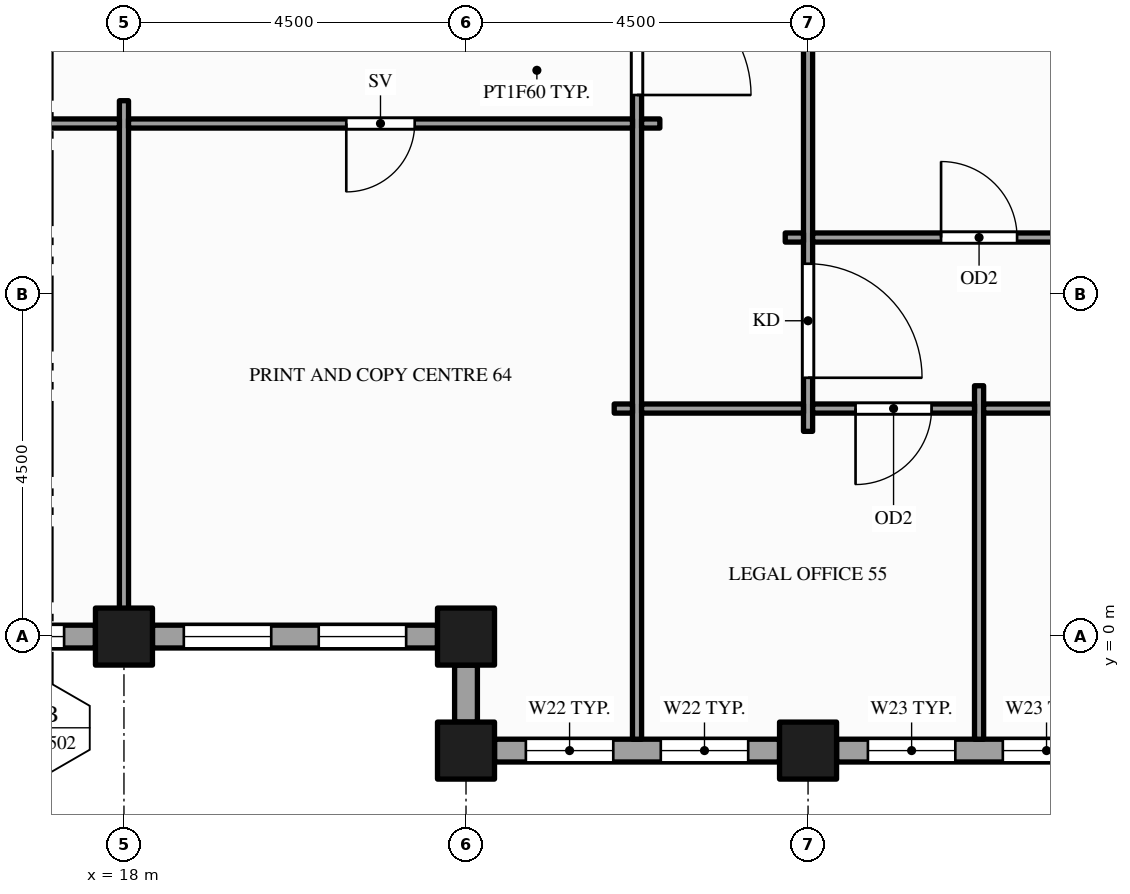
"""IFC4 building model, lengths in metres.
Left out: names, types, materials, properties, quantities, classifications, styles, units other than length and angle.
Written with IfcOpenShell. Run it as: python <this file> out.ifc"""

import sys

from ifc_helpers import new_model, si_unit, direction, frame, frame_2d, origin, origin_2d, place, context, subcontext, project, spatial, rectangle, hollow_rectangle, extrude, element, fill, save


model = new_model("IFC4")
c1 = context("Model", 3, precision=1e-05, world=origin(), true_north=direction((0.0, 1.0)))
c2 = subcontext(c1, "Body", "Model", "MODEL_VIEW")
j1 = project(units=[si_unit("LENGTHUNIT", "METRE"), si_unit("PLANEANGLEUNIT", "RADIAN")], contexts=[c1])
p1 = place(None, origin())
s1 = spatial("IfcSite", under=j1, at=p1, CompositionType="ELEMENT")
p2 = place(p1, origin())
s2 = spatial("IfcBuilding", under=s1, at=p2, CompositionType="ELEMENT")
p3 = place(p2, frame((0.0, 0.0, 215.0)))
s3 = spatial("IfcBuildingStorey", under=s2, at=p3, CompositionType="ELEMENT", Elevation=215.0)
for number, where, z_axis, x_axis in (
    (1, (18.0, 0.0, -0.15), (0.0, 0.0, 1.0), (1.0, 0.0, 0.0)),
    (2, (22.5, -1.5, -0.15), (0.0, 0.0, 1.0), (1.0, 0.0, 0.0)),
    (3, (22.5, 0.0, -0.15), (0.0, 0.0, 1.0), (1.0, 0.0, 0.0)),
    (4, (27.0, -1.5, -0.15), (0.0, 0.0, 1.0), (1.0, 0.0, 0.0)),
):
    element("IfcColumn", number, at=place(p3, frame(where, z_axis=z_axis, x_axis=x_axis)), inside=s3, PredefinedType="COLUMN", context=c2, shape_type="SweptSolid", body=[
        extrude(hollow_rectangle(XDim=0.75, YDim=0.75, WallThickness=0.036, at=origin_2d()), origin(), (0.0, 0.0, 1.0), 4.0),
    ])
p4 = place(p3, frame((22.875, -1.5, 0.0), z_axis=(0.0, 0.0, 1.0), x_axis=(1.0, 0.0, 0.0)))
e5 = element("IfcWall", 5, at=p4, inside=s3, PredefinedType="STANDARD", context=c2, shape_type="SweptSolid", body=[
    extrude(rectangle(XDim=3.75, YDim=0.3, at=frame_2d((1.875, 0.0))), origin(), (0.0, 0.0, 1.0), 2.76),
])
p5 = place(p4, frame((0.413, 0.0, 0.9)))
e6 = element("IfcOpeningElement", 6, at=p5, cuts=e5, PredefinedType="OPENING", context=c2, shape_type="SweptSolid", body=[
    extrude(rectangle(XDim=1.15, YDim=1.5, at=frame_2d((0.575, 0.75))), frame((0.0, 0.16, 0.0), z_axis=(0.0, -1.0, 0.0), x_axis=(1.0, 0.0, 0.0)), (0.0, 0.0, 1.0), 0.32),
])
p6 = place(p4, frame((2.188, 0.0, 0.9)))
e7 = element("IfcOpeningElement", 7, at=p6, cuts=e5, PredefinedType="OPENING", context=c2, shape_type="SweptSolid", body=[
    extrude(rectangle(XDim=1.15, YDim=1.5, at=frame_2d((0.575, 0.75))), frame((0.0, 0.16, 0.0), z_axis=(0.0, -1.0, 0.0), x_axis=(1.0, 0.0, 0.0)), (0.0, 0.0, 1.0), 0.32),
])
p7 = place(p3, frame((27.375, -1.5, 0.0), z_axis=(0.0, 0.0, 1.0), x_axis=(1.0, 0.0, 0.0)))
e8 = element("IfcWall", 8, at=p7, inside=s3, PredefinedType="STANDARD", context=c2, shape_type="SweptSolid", body=[
    extrude(rectangle(XDim=3.75, YDim=0.3, at=frame_2d((1.875, 0.0))), origin(), (0.0, 0.0, 1.0), 2.87),
])
p8 = place(p7, frame((0.413, 0.0, 0.9)))
e9 = element("IfcOpeningElement", 9, at=p8, cuts=e8, PredefinedType="OPENING", context=c2, shape_type="SweptSolid", body=[
    extrude(rectangle(XDim=1.15, YDim=1.75, at=frame_2d((0.575, 0.875))), frame((0.0, 0.16, 0.0), z_axis=(0.0, -1.0, 0.0), x_axis=(1.0, 0.0, 0.0)), (0.0, 0.0, 1.0), 0.32),
])
p9 = place(p7, frame((2.188, 0.0, 0.9)))
e10 = element("IfcOpeningElement", 10, at=p9, cuts=e8, PredefinedType="OPENING", context=c2, shape_type="SweptSolid", body=[
    extrude(rectangle(XDim=1.15, YDim=1.75, at=frame_2d((0.575, 0.875))), frame((0.0, 0.16, 0.0), z_axis=(0.0, -1.0, 0.0), x_axis=(1.0, 0.0, 0.0)), (0.0, 0.0, 1.0), 0.32),
])
p10 = place(p3, frame((13.875, 0.0, 0.0), z_axis=(0.0, 0.0, 1.0), x_axis=(1.0, 0.0, 0.0)))
e11 = element("IfcWall", 11, at=p10, inside=s3, PredefinedType="STANDARD", context=c2, shape_type="SweptSolid", body=[
    extrude(rectangle(XDim=3.75, YDim=0.3, at=frame_2d((1.875, 0.0))), origin(), (0.0, 0.0, 1.0), 2.87),
])
p11 = place(p10, frame((0.413, 0.0, 0.9)))
e12 = element("IfcOpeningElement", 12, at=p11, cuts=e11, PredefinedType="OPENING", context=c2, shape_type="SweptSolid", body=[
    extrude(rectangle(XDim=1.15, YDim=1.75, at=frame_2d((0.575, 0.875))), frame((0.0, 0.16, 0.0), z_axis=(0.0, -1.0, 0.0), x_axis=(1.0, 0.0, 0.0)), (0.0, 0.0, 1.0), 0.32),
])
p12 = place(p10, frame((2.188, 0.0, 0.9)))
e13 = element("IfcOpeningElement", 13, at=p12, cuts=e11, PredefinedType="OPENING", context=c2, shape_type="SweptSolid", body=[
    extrude(rectangle(XDim=1.15, YDim=1.75, at=frame_2d((0.575, 0.875))), frame((0.0, 0.16, 0.0), z_axis=(0.0, -1.0, 0.0), x_axis=(1.0, 0.0, 0.0)), (0.0, 0.0, 1.0), 0.32),
])
p13 = place(p3, frame((18.375, 0.0, 0.0), z_axis=(0.0, 0.0, 1.0), x_axis=(1.0, 0.0, 0.0)))
e14 = element("IfcWall", 14, at=p13, inside=s3, PredefinedType="STANDARD", context=c2, shape_type="SweptSolid", body=[
    extrude(rectangle(XDim=3.75, YDim=0.3, at=frame_2d((1.875, 0.0))), origin(), (0.0, 0.0, 1.0), 2.87),
])
p14 = place(p13, frame((0.413, 0.0, 0.9)))
e15 = element("IfcOpeningElement", 15, at=p14, cuts=e14, PredefinedType="OPENING", context=c2, shape_type="SweptSolid", body=[
    extrude(rectangle(XDim=1.15, YDim=1.75, at=frame_2d((0.575, 0.875))), frame((0.0, 0.16, 0.0), z_axis=(0.0, -1.0, 0.0), x_axis=(1.0, 0.0, 0.0)), (0.0, 0.0, 1.0), 0.32),
])
p15 = place(p13, frame((2.188, 0.0, 0.9)))
e16 = element("IfcOpeningElement", 16, at=p15, cuts=e14, PredefinedType="OPENING", context=c2, shape_type="SweptSolid", body=[
    extrude(rectangle(XDim=1.15, YDim=1.75, at=frame_2d((0.575, 0.875))), frame((0.0, 0.16, 0.0), z_axis=(0.0, -1.0, 0.0), x_axis=(1.0, 0.0, 0.0)), (0.0, 0.0, 1.0), 0.32),
])
p16 = place(p3, frame((22.5, -0.375, 0.0), z_axis=(0.0, 0.0, 1.0), x_axis=(0.0, -1.0, 0.0)))
e17 = element("IfcWall", 17, at=p16, inside=s3, PredefinedType="STANDARD", context=c2, shape_type="SweptSolid", body=[
    extrude(rectangle(XDim=0.75, YDim=0.3, at=frame_2d((0.375, 0.0))), origin(), (0.0, 0.0, 1.0), 3.157),
])
p17 = place(p3, frame((18.0, 0.15, 0.0), z_axis=(0.0, 0.0, 1.0), x_axis=(0.0, 1.0, 0.0)))
e18 = element("IfcWall", 18, at=p17, inside=s3, PredefinedType="PARTITIONING", context=c2, shape_type="SweptSolid", body=[
    extrude(rectangle(XDim=6.9, YDim=0.12, at=frame_2d((3.45, 0.0))), origin(), (0.0, 0.0, 1.0), 2.87),
])
p18 = place(p3, frame((24.75, -1.35, 0.0), z_axis=(0.0, 0.0, 1.0), x_axis=(0.0, 1.0, 0.0)))
e19 = element("IfcWall", 19, at=p18, inside=s3, PredefinedType="PARTITIONING", context=c2, shape_type="SweptSolid", body=[
    extrude(rectangle(XDim=24.101, YDim=0.12, at=frame_2d((12.05, 0.0))), origin(), (0.0, 0.0, 1.0), 2.76),
])
p19 = place(p18, frame((8.475, 0.0, 0.0)))
e20 = element("IfcOpeningElement", 20, at=p19, cuts=e19, PredefinedType="OPENING", context=c2, shape_type="SweptSolid", body=[
    extrude(rectangle(XDim=1.5, YDim=2.1, at=frame_2d((0.75, 1.05))), frame((0.0, 0.07, 0.0), z_axis=(0.0, -1.0, 0.0), x_axis=(1.0, 0.0, 0.0)), (0.0, 0.0, 1.0), 0.14),
])
p20 = place(p18, frame((13.5, 0.0, 0.0)))
e21 = element("IfcOpeningElement", 21, at=p20, cuts=e19, PredefinedType="OPENING", context=c2, shape_type="SweptSolid", body=[
    extrude(rectangle(XDim=1.2, YDim=2.1, at=frame_2d((0.6, 1.05))), frame((0.0, 0.07, 0.0), z_axis=(0.0, -1.0, 0.0), x_axis=(1.0, 0.0, 0.0)), (0.0, 0.0, 1.0), 0.14),
])
p21 = place(p3, frame((27.0, 2.7, 0.0), z_axis=(0.0, 0.0, 1.0), x_axis=(0.0, 1.0, 0.0)))
e22 = element("IfcWall", 22, at=p21, inside=s3, PredefinedType="PARTITIONING", context=c2, shape_type="SweptSolid", body=[
    extrude(rectangle(XDim=14.1, YDim=0.12, at=frame_2d((7.05, 0.0))), origin(), (0.0, 0.0, 1.0), 2.87),
])
p22 = place(p21, frame((0.705, 0.0, 0.0)))
e23 = element("IfcOpeningElement", 23, at=p22, cuts=e22, PredefinedType="OPENING", context=c2, shape_type="SweptSolid", body=[
    extrude(rectangle(XDim=1.5, YDim=2.1, at=frame_2d((0.75, 1.05))), frame((0.0, 0.07, 0.0), z_axis=(0.0, -1.0, 0.0), x_axis=(1.0, 0.0, 0.0)), (0.0, 0.0, 1.0), 0.14),
])
p23 = place(p21, frame((11.895, 0.0, 0.0)))
e24 = element("IfcOpeningElement", 24, at=p23, cuts=e22, PredefinedType="OPENING", context=c2, shape_type="SweptSolid", body=[
    extrude(rectangle(XDim=1.5, YDim=2.1, at=frame_2d((0.75, 1.05))), frame((0.0, 0.07, 0.0), z_axis=(0.0, -1.0, 0.0), x_axis=(1.0, 0.0, 0.0)), (0.0, 0.0, 1.0), 0.14),
])
p24 = place(p3, frame((29.25, -1.35, 0.0), z_axis=(0.0, 0.0, 1.0), x_axis=(0.0, 1.0, 0.0)))
e25 = element("IfcWall", 25, at=p24, inside=s3, PredefinedType="PARTITIONING", context=c2, shape_type="SweptSolid", body=[
    extrude(rectangle(XDim=4.65, YDim=0.12, at=frame_2d((2.325, 0.0))), origin(), (0.0, 0.0, 1.0), 2.87),
])
p25 = place(p3, frame((24.45, 3.0, 0.0), z_axis=(0.0, 0.0, 1.0), x_axis=(1.0, 0.0, 0.0)))
e26 = element("IfcWall", 26, at=p25, inside=s3, PredefinedType="PARTITIONING", context=c2, shape_type="SweptSolid", body=[
    extrude(rectangle(XDim=0.24, YDim=0.12, at=frame_2d((0.12, 0.0))), origin(), (0.0, 0.0, 1.0), 2.76),
])
p26 = place(p3, frame((24.81, 3.0, 0.0), z_axis=(0.0, 0.0, 1.0), x_axis=(1.0, 0.0, 0.0)))
e27 = element("IfcWall", 27, at=p26, inside=s3, PredefinedType="PARTITIONING", context=c2, shape_type="SweptSolid", body=[
    extrude(rectangle(XDim=2.13, YDim=0.12, at=frame_2d((1.065, 0.0))), origin(), (0.0, 0.0, 1.0), 2.76),
])
p27 = place(p3, frame((27.06, 3.0, 0.0), z_axis=(0.0, 0.0, 1.0), x_axis=(1.0, 0.0, 0.0)))
e28 = element("IfcWall", 28, at=p27, inside=s3, PredefinedType="PARTITIONING", context=c2, shape_type="SweptSolid", body=[
    extrude(rectangle(XDim=2.13, YDim=0.12, at=frame_2d((1.065, 0.0))), origin(), (0.0, 0.0, 1.0), 2.87),
])
p28 = place(p27, frame((0.565, 0.0, 0.0)))
e29 = element("IfcOpeningElement", 29, at=p28, cuts=e28, PredefinedType="OPENING", context=c2, shape_type="SweptSolid", body=[
    extrude(rectangle(XDim=1.0, YDim=2.1, at=frame_2d((0.5, 1.05))), frame((0.0, 0.07, 0.0), z_axis=(0.0, -1.0, 0.0), x_axis=(1.0, 0.0, 0.0)), (0.0, 0.0, 1.0), 0.14),
])
p29 = place(p3, frame((29.31, 3.0, 0.0), z_axis=(0.0, 0.0, 1.0), x_axis=(1.0, 0.0, 0.0)))
e30 = element("IfcWall", 30, at=p29, inside=s3, PredefinedType="PARTITIONING", context=c2, shape_type="SweptSolid", body=[
    extrude(rectangle(XDim=4.38, YDim=0.12, at=frame_2d((2.19, 0.0))), origin(), (0.0, 0.0, 1.0), 2.87),
])
p30 = place(p29, frame((1.69, 0.0, 0.0)))
e31 = element("IfcOpeningElement", 31, at=p30, cuts=e30, PredefinedType="OPENING", context=c2, shape_type="SweptSolid", body=[
    extrude(rectangle(XDim=1.0, YDim=2.1, at=frame_2d((0.5, 1.05))), frame((0.0, 0.07, 0.0), z_axis=(0.0, -1.0, 0.0), x_axis=(1.0, 0.0, 0.0)), (0.0, 0.0, 1.0), 0.14),
])
p31 = place(p3, frame((26.7, 5.25, 0.0), z_axis=(0.0, 0.0, 1.0), x_axis=(1.0, 0.0, 0.0)))
e32 = element("IfcWall", 32, at=p31, inside=s3, PredefinedType="PARTITIONING", context=c2, shape_type="SweptSolid", body=[
    extrude(rectangle(XDim=0.24, YDim=0.12, at=frame_2d((0.12, 0.0))), origin(), (0.0, 0.0, 1.0), 2.87),
])
p32 = place(p3, frame((27.06, 5.25, 0.0), z_axis=(0.0, 0.0, 1.0), x_axis=(1.0, 0.0, 0.0)))
e33 = element("IfcWall", 33, at=p32, inside=s3, PredefinedType="PARTITIONING", context=c2, shape_type="SweptSolid", body=[
    extrude(rectangle(XDim=4.38, YDim=0.12, at=frame_2d((2.19, 0.0))), origin(), (0.0, 0.0, 1.0), 2.87),
])
p33 = place(p32, frame((1.69, 0.0, 0.0)))
e34 = element("IfcOpeningElement", 34, at=p33, cuts=e33, PredefinedType="OPENING", context=c2, shape_type="SweptSolid", body=[
    extrude(rectangle(XDim=1.0, YDim=2.1, at=frame_2d((0.5, 1.05))), frame((0.0, 0.07, 0.0), z_axis=(0.0, -1.0, 0.0), x_axis=(1.0, 0.0, 0.0)), (0.0, 0.0, 1.0), 0.14),
])
p34 = place(p3, frame((11.31, 6.75, 0.0), z_axis=(0.0, 0.0, 1.0), x_axis=(1.0, 0.0, 0.0)))
e35 = element("IfcWall", 35, at=p34, inside=s3, PredefinedType="PARTITIONING", context=c2, shape_type="SweptSolid", body=[
    extrude(rectangle(XDim=6.63, YDim=0.12, at=frame_2d((3.315, 0.0))), origin(), (0.0, 0.0, 1.0), 2.87),
])
p35 = place(p34, frame((2.815, 0.0, 0.0)))
e36 = element("IfcOpeningElement", 36, at=p35, cuts=e35, PredefinedType="OPENING", context=c2, shape_type="SweptSolid", body=[
    extrude(rectangle(XDim=1.0, YDim=2.1, at=frame_2d((0.5, 1.05))), frame((0.0, 0.07, 0.0), z_axis=(0.0, -1.0, 0.0), x_axis=(1.0, 0.0, 0.0)), (0.0, 0.0, 1.0), 0.14),
])
p36 = place(p3, frame((18.06, 6.75, 0.0), z_axis=(0.0, 0.0, 1.0), x_axis=(1.0, 0.0, 0.0)))
e37 = element("IfcWall", 37, at=p36, inside=s3, PredefinedType="PARTITIONING", context=c2, shape_type="SweptSolid", body=[
    extrude(rectangle(XDim=6.63, YDim=0.12, at=frame_2d((3.315, 0.0))), origin(), (0.0, 0.0, 1.0), 2.76),
])
p37 = place(p36, frame((2.865, 0.0, 0.0)))
e38 = element("IfcOpeningElement", 38, at=p37, cuts=e37, PredefinedType="OPENING", context=c2, shape_type="SweptSolid", body=[
    extrude(rectangle(XDim=0.9, YDim=2.1, at=frame_2d((0.45, 1.05))), frame((0.0, 0.07, 0.0), z_axis=(0.0, -1.0, 0.0), x_axis=(1.0, 0.0, 0.0)), (0.0, 0.0, 1.0), 0.14),
])
p38 = place(p3, frame((24.81, 6.75, 0.0), z_axis=(0.0, 0.0, 1.0), x_axis=(1.0, 0.0, 0.0)))
e39 = element("IfcWall", 39, at=p38, inside=s3, PredefinedType="PARTITIONING", context=c2, shape_type="SweptSolid", body=[
    extrude(rectangle(XDim=0.24, YDim=0.12, at=frame_2d((0.12, 0.0))), origin(), (0.0, 0.0, 1.0), 2.76),
])
p39 = place(p5, origin())
e40 = element("IfcWindow", 40, at=p39, inside=s3, PartitioningType="SINGLE_PANEL", PredefinedType="WINDOW", context=c2, shape_type="SweptSolid", body=[
    extrude(rectangle(XDim=1.15, YDim=1.5, at=frame_2d((0.575, 0.75))), frame((0.0, 0.03, 0.0), z_axis=(0.0, -1.0, 0.0), x_axis=(1.0, 0.0, 0.0)), (0.0, 0.0, 1.0), 0.06),
])
fill(e6, e40)
p40 = place(p6, origin())
e41 = element("IfcWindow", 41, at=p40, inside=s3, PartitioningType="SINGLE_PANEL", PredefinedType="WINDOW", context=c2, shape_type="SweptSolid", body=[
    extrude(rectangle(XDim=1.15, YDim=1.5, at=frame_2d((0.575, 0.75))), frame((0.0, 0.03, 0.0), z_axis=(0.0, -1.0, 0.0), x_axis=(1.0, 0.0, 0.0)), (0.0, 0.0, 1.0), 0.06),
])
fill(e7, e41)
p41 = place(p8, origin())
e42 = element("IfcWindow", 42, at=p41, inside=s3, PartitioningType="SINGLE_PANEL", PredefinedType="WINDOW", context=c2, shape_type="SweptSolid", body=[
    extrude(rectangle(XDim=1.15, YDim=1.75, at=frame_2d((0.575, 0.875))), frame((0.0, 0.03, 0.0), z_axis=(0.0, -1.0, 0.0), x_axis=(1.0, 0.0, 0.0)), (0.0, 0.0, 1.0), 0.06),
])
fill(e9, e42)
p42 = place(p9, origin())
e43 = element("IfcWindow", 43, at=p42, inside=s3, PartitioningType="SINGLE_PANEL", PredefinedType="WINDOW", context=c2, shape_type="SweptSolid", body=[
    extrude(rectangle(XDim=1.15, YDim=1.75, at=frame_2d((0.575, 0.875))), frame((0.0, 0.03, 0.0), z_axis=(0.0, -1.0, 0.0), x_axis=(1.0, 0.0, 0.0)), (0.0, 0.0, 1.0), 0.06),
])
fill(e10, e43)
p43 = place(p12, origin())
e44 = element("IfcWindow", 44, at=p43, inside=s3, PartitioningType="SINGLE_PANEL", PredefinedType="WINDOW", context=c2, shape_type="SweptSolid", body=[
    extrude(rectangle(XDim=1.15, YDim=1.75, at=frame_2d((0.575, 0.875))), frame((0.0, 0.03, 0.0), z_axis=(0.0, -1.0, 0.0), x_axis=(1.0, 0.0, 0.0)), (0.0, 0.0, 1.0), 0.06),
])
fill(e13, e44)
p44 = place(p14, origin())
e45 = element("IfcWindow", 45, at=p44, inside=s3, PartitioningType="SINGLE_PANEL", PredefinedType="WINDOW", context=c2, shape_type="SweptSolid", body=[
    extrude(rectangle(XDim=1.15, YDim=1.75, at=frame_2d((0.575, 0.875))), frame((0.0, 0.03, 0.0), z_axis=(0.0, -1.0, 0.0), x_axis=(1.0, 0.0, 0.0)), (0.0, 0.0, 1.0), 0.06),
])
fill(e15, e45)
p45 = place(p15, origin())
e46 = element("IfcWindow", 46, at=p45, inside=s3, PartitioningType="SINGLE_PANEL", PredefinedType="WINDOW", context=c2, shape_type="SweptSolid", body=[
    extrude(rectangle(XDim=1.15, YDim=1.75, at=frame_2d((0.575, 0.875))), frame((0.0, 0.03, 0.0), z_axis=(0.0, -1.0, 0.0), x_axis=(1.0, 0.0, 0.0)), (0.0, 0.0, 1.0), 0.06),
])
fill(e16, e46)
p46 = place(p19, origin())
e47 = element("IfcDoor", 47, at=p46, inside=s3, OperationType="SINGLE_SWING_LEFT", PredefinedType="DOOR", context=c2, shape_type="SweptSolid", body=[
    extrude(rectangle(XDim=1.5, YDim=2.1, at=frame_2d((0.75, 1.05))), frame((0.0, 0.025, 0.0), z_axis=(0.0, -1.0, 0.0), x_axis=(1.0, 0.0, 0.0)), (0.0, 0.0, 1.0), 0.05),
])
fill(e20, e47)
p47 = place(p22, origin())
e48 = element("IfcDoor", 48, at=p47, inside=s3, OperationType="SINGLE_SWING_LEFT", PredefinedType="DOOR", context=c2, shape_type="SweptSolid", body=[
    extrude(rectangle(XDim=1.5, YDim=2.1, at=frame_2d((0.75, 1.05))), frame((0.0, 0.025, 0.0), z_axis=(0.0, -1.0, 0.0), x_axis=(1.0, 0.0, 0.0)), (0.0, 0.0, 1.0), 0.05),
])
fill(e23, e48)
p48 = place(p37, origin())
e49 = element("IfcDoor", 49, at=p48, inside=s3, OperationType="SINGLE_SWING_LEFT", PredefinedType="DOOR", context=c2, shape_type="SweptSolid", body=[
    extrude(rectangle(XDim=0.9, YDim=2.1, at=frame_2d((0.45, 1.05))), frame((0.0, 0.025, 0.0), z_axis=(0.0, -1.0, 0.0), x_axis=(1.0, 0.0, 0.0)), (0.0, 0.0, 1.0), 0.05),
])
fill(e38, e49)
p49 = place(p33, origin())
e50 = element("IfcDoor", 50, at=p49, inside=s3, OperationType="SINGLE_SWING_LEFT", PredefinedType="DOOR", context=c2, shape_type="SweptSolid", body=[
    extrude(rectangle(XDim=1.0, YDim=2.1, at=frame_2d((0.5, 1.05))), frame((0.0, 0.025, 0.0), z_axis=(0.0, -1.0, 0.0), x_axis=(1.0, 0.0, 0.0)), (0.0, 0.0, 1.0), 0.05),
])
fill(e34, e50)
p50 = place(p28, origin())
e51 = element("IfcDoor", 51, at=p50, inside=s3, OperationType="SINGLE_SWING_LEFT", PredefinedType="DOOR", context=c2, shape_type="SweptSolid", body=[
    extrude(rectangle(XDim=1.0, YDim=2.1, at=frame_2d((0.5, 1.05))), frame((0.0, 0.025, 0.0), z_axis=(0.0, -1.0, 0.0), x_axis=(1.0, 0.0, 0.0)), (0.0, 0.0, 1.0), 0.05),
])
fill(e29, e51)
save(model, sys.argv[1])
